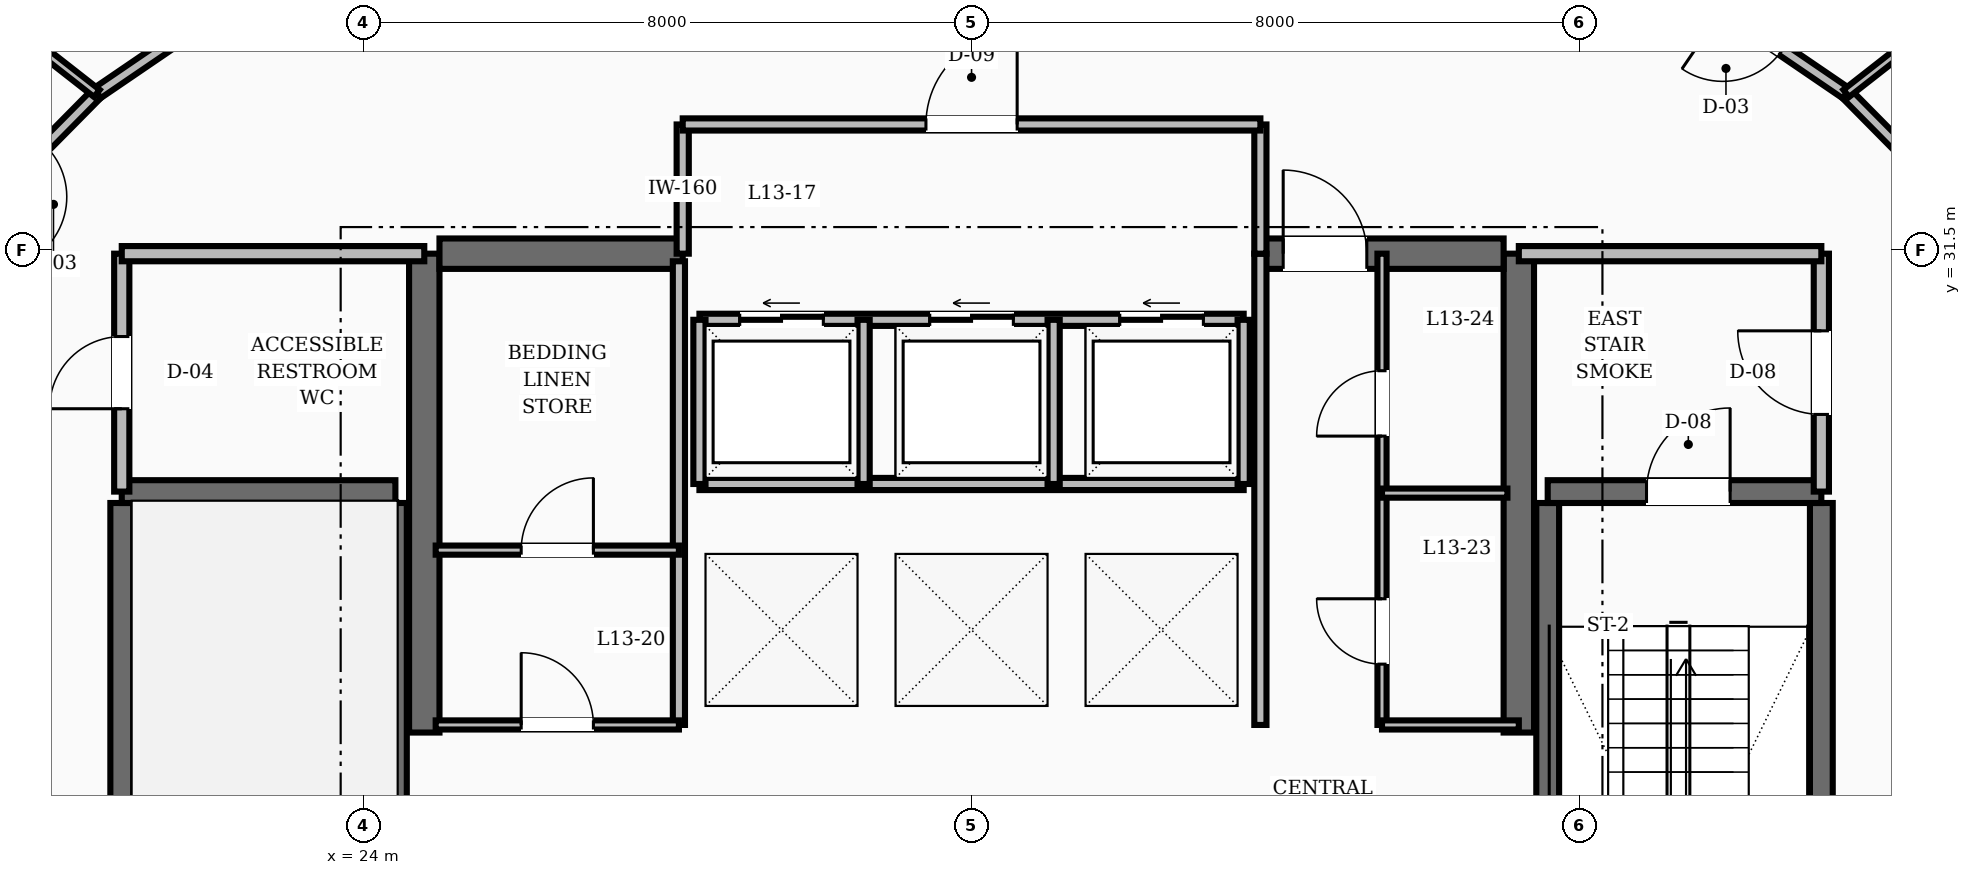
"""IFC4 building model, lengths in metres.
Left out: names, types, materials, properties, quantities, classifications, styles, units other than length and angle.
Written with IfcOpenShell. Run it as: python <this file> out.ifc"""

import sys

from ifc_helpers import new_model, si_unit, direction, frame, frame_2d, origin, place, context, subcontext, project, spatial, rectangle, extrude, element, fill, save


model = new_model("IFC4")
c1 = context("Model", 3, precision=1e-05, world=origin(), true_north=direction((0.0, 1.0)))
c2 = subcontext(c1, "Body", "Model", "MODEL_VIEW")
j1 = project(units=[si_unit("LENGTHUNIT", "METRE"), si_unit("PLANEANGLEUNIT", "RADIAN")], contexts=[c1])
p1 = place(None, origin())
s1 = spatial("IfcSite", under=j1, at=p1, CompositionType="ELEMENT")
p2 = place(p1, origin())
s2 = spatial("IfcBuilding", under=s1, at=p2, CompositionType="ELEMENT")
p3 = place(p2, frame((0.0, 0.0, 55.6)))
s3 = spatial("IfcBuildingStorey", under=s2, at=p3, CompositionType="ELEMENT", Elevation=55.6)
for number, where, z_axis, x_axis in (
    (1, (24.8, 25.15, 0.0), (0.0, 0.0, 1.0), (0.0, 1.0, 0.0)),
    (2, (39.2, 25.15, 0.0), (0.0, 0.0, 1.0), (0.0, 1.0, 0.0)),
):
    element("IfcWall", number, at=place(p3, frame(where, z_axis=z_axis, x_axis=x_axis)), inside=s3, PredefinedType="SHEAR", context=c2, shape_type="SweptSolid", body=[
        extrude(rectangle(XDim=6.3, YDim=0.4, at=frame_2d((3.15, 0.0))), origin(), (0.0, 0.0, 1.0), 3.6),
    ])
p4 = place(p3, frame((25.0, 31.45, 0.0), z_axis=(0.0, 0.0, 1.0), x_axis=(1.0, 0.0, 0.0)))
e3 = element("IfcWall", 3, at=p4, inside=s3, PredefinedType="SHEAR", context=c2, shape_type="SweptSolid", body=[
    extrude(rectangle(XDim=3.2, YDim=0.4, at=frame_2d((1.6, 0.0))), origin(), (0.0, 0.0, 1.0), 3.6),
])
p5 = place(p3, frame((35.8, 31.45, 0.0), z_axis=(0.0, 0.0, 1.0), x_axis=(1.0, 0.0, 0.0)))
e4 = element("IfcWall", 4, at=p5, inside=s3, PredefinedType="SHEAR", context=c2, shape_type="SweptSolid", body=[
    extrude(rectangle(XDim=3.2, YDim=0.4, at=frame_2d((1.6, 0.0))), origin(), (0.0, 0.0, 1.0), 3.6),
])
p6 = place(p5, frame((0.3, 0.0, 0.0)))
e5 = element("IfcOpeningElement", 5, at=p6, cuts=e4, PredefinedType="OPENING", context=c2, shape_type="SweptSolid", body=[
    extrude(rectangle(XDim=1.1, YDim=2.1, at=frame_2d((0.55, 1.05))), frame((0.0, 0.21, 0.0), z_axis=(0.0, -1.0, 0.0), x_axis=(1.0, 0.0, 0.0)), (0.0, 0.0, 1.0), 0.42),
])
for number, where, z_axis, x_axis in (
    (6, (20.82, 19.43, 0.0), (0.0, 0.0, 1.0), (0.0, 1.0, 0.0)),
    (7, (24.42, 19.43, 0.0), (0.0, 0.0, 1.0), (0.0, 1.0, 0.0)),
):
    element("IfcWall", number, at=place(p3, frame(where, z_axis=z_axis, x_axis=x_axis)), inside=s3, PredefinedType="SHEAR", context=c2, shape_type="SweptSolid", body=[
        extrude(rectangle(XDim=8.74, YDim=0.3, at=frame_2d((4.37, 0.0))), origin(), (0.0, 0.0, 1.0), 3.6),
    ])
p7 = place(p3, frame((20.82, 28.32, 0.0), z_axis=(0.0, 0.0, 1.0), x_axis=(1.0, 0.0, 0.0)))
e8 = element("IfcWall", 8, at=p7, inside=s3, PredefinedType="SHEAR", context=c2, shape_type="SweptSolid", body=[
    extrude(rectangle(XDim=3.6, YDim=0.3, at=frame_2d((1.8, 0.0))), origin(), (0.0, 0.0, 1.0), 3.6),
])
for number, where, z_axis, x_axis in (
    (9, (43.18, 19.43, 0.0), (0.0, 0.0, 1.0), (0.0, 1.0, 0.0)),
    (10, (39.58, 19.43, 0.0), (0.0, 0.0, 1.0), (0.0, 1.0, 0.0)),
):
    element("IfcWall", number, at=place(p3, frame(where, z_axis=z_axis, x_axis=x_axis)), inside=s3, PredefinedType="SHEAR", context=c2, shape_type="SweptSolid", body=[
        extrude(rectangle(XDim=8.74, YDim=0.3, at=frame_2d((4.37, 0.0))), origin(), (0.0, 0.0, 1.0), 3.6),
    ])
p8 = place(p3, frame((39.58, 28.32, 0.0), z_axis=(0.0, 0.0, 1.0), x_axis=(1.0, 0.0, 0.0)))
e11 = element("IfcWall", 11, at=p8, inside=s3, PredefinedType="SHEAR", context=c2, shape_type="SweptSolid", body=[
    extrude(rectangle(XDim=3.6, YDim=0.3, at=frame_2d((1.8, 0.0))), origin(), (0.0, 0.0, 1.0), 3.6),
])
p9 = place(p8, frame((1.3, 0.0, 0.0)))
e12 = element("IfcOpeningElement", 12, at=p9, cuts=e11, PredefinedType="OPENING", context=c2, shape_type="SweptSolid", body=[
    extrude(rectangle(XDim=1.1, YDim=2.1, at=frame_2d((0.55, 1.05))), frame((0.0, 0.16, 0.0), z_axis=(0.0, -1.0, 0.0), x_axis=(1.0, 0.0, 0.0)), (0.0, 0.0, 1.0), 0.32),
])
p10 = place(p3, frame((43.18, 28.32, 0.0), z_axis=(0.0, 0.0, 1.0), x_axis=(0.0, 1.0, 0.0)))
e13 = element("IfcWall", 13, at=p10, inside=s3, PredefinedType="SOLIDWALL", context=c2, shape_type="SweptSolid", body=[
    extrude(rectangle(XDim=3.13, YDim=0.2, at=frame_2d((1.565, 0.0))), origin(), (0.0, 0.0, 1.0), 2.61),
])
p11 = place(p10, frame((1.015, 0.0, 0.0)))
e14 = element("IfcOpeningElement", 14, at=p11, cuts=e13, PredefinedType="OPENING", context=c2, shape_type="SweptSolid", body=[
    extrude(rectangle(XDim=1.1, YDim=2.1, at=frame_2d((0.55, 1.05))), frame((0.0, 0.11, 0.0), z_axis=(0.0, -1.0, 0.0), x_axis=(1.0, 0.0, 0.0)), (0.0, 0.0, 1.0), 0.22),
])
p12 = place(p3, frame((39.2, 31.45, 0.0), z_axis=(0.0, 0.0, 1.0), x_axis=(1.0, 0.0, 0.0)))
e15 = element("IfcWall", 15, at=p12, inside=s3, PredefinedType="SOLIDWALL", context=c2, shape_type="SweptSolid", body=[
    extrude(rectangle(XDim=3.98, YDim=0.2, at=frame_2d((1.99, 0.0))), origin(), (0.0, 0.0, 1.0), 2.61),
])
p13 = place(p3, frame((20.82, 28.32, 0.0), z_axis=(0.0, 0.0, 1.0), x_axis=(0.0, 1.0, 0.0)))
e16 = element("IfcWall", 16, at=p13, inside=s3, PredefinedType="SOLIDWALL", context=c2, shape_type="SweptSolid", body=[
    extrude(rectangle(XDim=3.13, YDim=0.2, at=frame_2d((1.565, 0.0))), origin(), (0.0, 0.0, 1.0), 2.61),
])
p14 = place(p13, frame((1.09, 0.0, 0.0)))
e17 = element("IfcOpeningElement", 17, at=p14, cuts=e16, PredefinedType="OPENING", context=c2, shape_type="SweptSolid", body=[
    extrude(rectangle(XDim=0.95, YDim=2.1, at=frame_2d((0.475, 1.05))), frame((0.0, 0.11, 0.0), z_axis=(0.0, -1.0, 0.0), x_axis=(1.0, 0.0, 0.0)), (0.0, 0.0, 1.0), 0.22),
])
p15 = place(p3, frame((20.82, 31.45, 0.0), z_axis=(0.0, 0.0, 1.0), x_axis=(1.0, 0.0, 0.0)))
e18 = element("IfcWall", 18, at=p15, inside=s3, PredefinedType="SOLIDWALL", context=c2, shape_type="SweptSolid", body=[
    extrude(rectangle(XDim=3.98, YDim=0.2, at=frame_2d((1.99, 0.0))), origin(), (0.0, 0.0, 1.0), 2.61),
])
p16 = place(p3, frame((35.8, 25.25, 0.0), z_axis=(0.0, 0.0, 1.0), x_axis=(0.0, 1.0, 0.0)))
e19 = element("IfcWall", 19, at=p16, inside=s3, PredefinedType="SOLIDWALL", context=c2, shape_type="SweptSolid", body=[
    extrude(rectangle(XDim=6.2, YDim=0.16, at=frame_2d((3.1, 0.0))), origin(), (0.0, 0.0, 1.0), 2.61),
])
p17 = place(p3, frame((28.42, 30.58, 0.0), z_axis=(0.0, 0.0, 1.0), x_axis=(1.0, 0.0, 0.0)))
e20 = element("IfcWall", 20, at=p17, inside=s3, PredefinedType="SOLIDWALL", context=c2, shape_type="SweptSolid", body=[
    extrude(rectangle(XDim=7.16, YDim=0.16, at=frame_2d((3.58, 0.0))), origin(), (0.0, 0.0, 1.0), 2.61),
])
p18 = place(p17, frame((0.53, 0.0, 0.0)))
e21 = element("IfcOpeningElement", 21, at=p18, cuts=e20, PredefinedType="OPENING", context=c2, shape_type="SweptSolid", body=[
    extrude(rectangle(XDim=1.1, YDim=2.15, at=frame_2d((0.55, 1.075))), frame((0.0, 0.09, 0.0), z_axis=(0.0, -1.0, 0.0), x_axis=(1.0, 0.0, 0.0)), (0.0, 0.0, 1.0), 0.18),
])
p19 = place(p17, frame((3.03, 0.0, 0.0)))
e22 = element("IfcOpeningElement", 22, at=p19, cuts=e20, PredefinedType="OPENING", context=c2, shape_type="SweptSolid", body=[
    extrude(rectangle(XDim=1.1, YDim=2.15, at=frame_2d((0.55, 1.075))), frame((0.0, 0.09, 0.0), z_axis=(0.0, -1.0, 0.0), x_axis=(1.0, 0.0, 0.0)), (0.0, 0.0, 1.0), 0.18),
])
p20 = place(p17, frame((5.53, 0.0, 0.0)))
e23 = element("IfcOpeningElement", 23, at=p20, cuts=e20, PredefinedType="OPENING", context=c2, shape_type="SweptSolid", body=[
    extrude(rectangle(XDim=1.1, YDim=2.15, at=frame_2d((0.55, 1.075))), frame((0.0, 0.09, 0.0), z_axis=(0.0, -1.0, 0.0), x_axis=(1.0, 0.0, 0.0)), (0.0, 0.0, 1.0), 0.18),
])
p21 = place(p3, frame((28.42, 28.42, 0.0), z_axis=(0.0, 0.0, 1.0), x_axis=(1.0, 0.0, 0.0)))
e24 = element("IfcWall", 24, at=p21, inside=s3, PredefinedType="SOLIDWALL", context=c2, shape_type="SweptSolid", body=[
    extrude(rectangle(XDim=7.16, YDim=0.16, at=frame_2d((3.58, 0.0))), origin(), (0.0, 0.0, 1.0), 2.61),
])
for number, where, z_axis, x_axis in (
    (25, (28.42, 28.42, 0.0), (0.0, 0.0, 1.0), (0.0, 1.0, 0.0)),
    (26, (30.58, 28.42, 0.0), (0.0, 0.0, 1.0), (0.0, 1.0, 0.0)),
    (27, (33.08, 28.42, 0.0), (0.0, 0.0, 1.0), (0.0, 1.0, 0.0)),
    (28, (35.58, 28.42, 0.0), (0.0, 0.0, 1.0), (0.0, 1.0, 0.0)),
):
    element("IfcWall", number, at=place(p3, frame(where, z_axis=z_axis, x_axis=x_axis)), inside=s3, PredefinedType="SOLIDWALL", context=c2, shape_type="SweptSolid", body=[
        extrude(rectangle(XDim=2.16, YDim=0.16, at=frame_2d((1.08, 0.0))), origin(), (0.0, 0.0, 1.0), 2.61),
    ])
for number, where, z_axis, x_axis in (
    (29, (28.2, 31.45, 0.0), (0.0, 0.0, 1.0), (0.0, 1.0, 0.0)),
    (30, (35.8, 31.45, 0.0), (0.0, 0.0, 1.0), (0.0, 1.0, 0.0)),
):
    element("IfcWall", number, at=place(p3, frame(where, z_axis=z_axis, x_axis=x_axis)), inside=s3, PredefinedType="SOLIDWALL", context=c2, shape_type="SweptSolid", body=[
        extrude(rectangle(XDim=1.7, YDim=0.16, at=frame_2d((0.85, 0.0))), origin(), (0.0, 0.0, 1.0), 2.61),
    ])
p22 = place(p3, frame((28.2, 33.15, 0.0), z_axis=(0.0, 0.0, 1.0), x_axis=(1.0, 0.0, 0.0)))
e31 = element("IfcWall", 31, at=p22, inside=s3, PredefinedType="SOLIDWALL", context=c2, shape_type="SweptSolid", body=[
    extrude(rectangle(XDim=7.6, YDim=0.16, at=frame_2d((3.8, 0.0))), origin(), (0.0, 0.0, 1.0), 2.61),
])
p23 = place(p22, frame((3.2, 0.0, 0.0)))
e32 = element("IfcOpeningElement", 32, at=p23, cuts=e31, PredefinedType="OPENING", context=c2, shape_type="SweptSolid", body=[
    extrude(rectangle(XDim=1.2, YDim=2.1, at=frame_2d((0.6, 1.05))), frame((0.0, 0.09, 0.0), z_axis=(0.0, -1.0, 0.0), x_axis=(1.0, 0.0, 0.0)), (0.0, 0.0, 1.0), 0.18),
])
p24 = place(p3, frame((28.15, 25.25, 0.0), z_axis=(0.0, 0.0, 1.0), x_axis=(0.0, 1.0, 0.0)))
e33 = element("IfcWall", 33, at=p24, inside=s3, PredefinedType="SOLIDWALL", context=c2, shape_type="SweptSolid", body=[
    extrude(rectangle(XDim=6.1, YDim=0.16, at=frame_2d((3.05, 0.0))), origin(), (0.0, 0.0, 1.0), 2.61),
])
p25 = place(p3, frame((24.95, 25.25, 0.0), z_axis=(0.0, 0.0, 1.0), x_axis=(1.0, 0.0, 0.0)))
e34 = element("IfcWall", 34, at=p25, inside=s3, PredefinedType="PARTITIONING", context=c2, shape_type="SweptSolid", body=[
    extrude(rectangle(XDim=3.2, YDim=0.12, at=frame_2d((1.6, 0.0))), origin(), (0.0, 0.0, 1.0), 2.61),
])
p26 = place(p25, frame((1.125, 0.0, 0.0)))
e35 = element("IfcOpeningElement", 35, at=p26, cuts=e34, PredefinedType="OPENING", context=c2, shape_type="SweptSolid", body=[
    extrude(rectangle(XDim=0.95, YDim=2.1, at=frame_2d((0.475, 1.05))), frame((0.0, 0.07, 0.0), z_axis=(0.0, -1.0, 0.0), x_axis=(1.0, 0.0, 0.0)), (0.0, 0.0, 1.0), 0.14),
])
p27 = place(p3, frame((37.4, 25.25, 0.0), z_axis=(0.0, 0.0, 1.0), x_axis=(0.0, 1.0, 0.0)))
e36 = element("IfcWall", 36, at=p27, inside=s3, PredefinedType="PARTITIONING", context=c2, shape_type="SweptSolid", body=[
    extrude(rectangle(XDim=6.2, YDim=0.12, at=frame_2d((3.1, 0.0))), origin(), (0.0, 0.0, 1.0), 2.61),
])
p28 = place(p27, frame((0.8, 0.0, 0.0)))
e37 = element("IfcOpeningElement", 37, at=p28, cuts=e36, PredefinedType="OPENING", context=c2, shape_type="SweptSolid", body=[
    extrude(rectangle(XDim=0.86, YDim=2.1, at=frame_2d((0.43, 1.05))), frame((0.0, 0.07, 0.0), z_axis=(0.0, -1.0, 0.0), x_axis=(1.0, 0.0, 0.0)), (0.0, 0.0, 1.0), 0.14),
])
p29 = place(p27, frame((3.8, 0.0, 0.0)))
e38 = element("IfcOpeningElement", 38, at=p29, cuts=e36, PredefinedType="OPENING", context=c2, shape_type="SweptSolid", body=[
    extrude(rectangle(XDim=0.86, YDim=2.1, at=frame_2d((0.43, 1.05))), frame((0.0, 0.07, 0.0), z_axis=(0.0, -1.0, 0.0), x_axis=(1.0, 0.0, 0.0)), (0.0, 0.0, 1.0), 0.14),
])
p30 = place(p3, frame((37.4, 25.25, 0.0), z_axis=(0.0, 0.0, 1.0), x_axis=(1.0, 0.0, 0.0)))
e39 = element("IfcWall", 39, at=p30, inside=s3, PredefinedType="PARTITIONING", context=c2, shape_type="SweptSolid", body=[
    extrude(rectangle(XDim=1.8, YDim=0.12, at=frame_2d((0.9, 0.0))), origin(), (0.0, 0.0, 1.0), 2.61),
])
p31 = place(p3, frame((24.95, 27.55, 0.0), z_axis=(0.0, 0.0, 1.0), x_axis=(1.0, 0.0, 0.0)))
e40 = element("IfcWall", 40, at=p31, inside=s3, PredefinedType="PARTITIONING", context=c2, shape_type="SweptSolid", body=[
    extrude(rectangle(XDim=3.2, YDim=0.12, at=frame_2d((1.6, 0.0))), origin(), (0.0, 0.0, 1.0), 2.61),
])
p32 = place(p31, frame((1.125, 0.0, 0.0)))
e41 = element("IfcOpeningElement", 41, at=p32, cuts=e40, PredefinedType="OPENING", context=c2, shape_type="SweptSolid", body=[
    extrude(rectangle(XDim=0.95, YDim=2.1, at=frame_2d((0.475, 1.05))), frame((0.0, 0.07, 0.0), z_axis=(0.0, -1.0, 0.0), x_axis=(1.0, 0.0, 0.0)), (0.0, 0.0, 1.0), 0.14),
])
p33 = place(p3, frame((37.4, 28.3, 0.0), z_axis=(0.0, 0.0, 1.0), x_axis=(1.0, 0.0, 0.0)))
e42 = element("IfcWall", 42, at=p33, inside=s3, PredefinedType="PARTITIONING", context=c2, shape_type="SweptSolid", body=[
    extrude(rectangle(XDim=1.65, YDim=0.12, at=frame_2d((0.825, 0.0))), origin(), (0.0, 0.0, 1.0), 2.61),
])
p34 = place(p3, frame((45.531, 31.51, 0.0), z_axis=(0.0, 0.0, 1.0), x_axis=(-0.702811997, 0.711375636969, 0.0)))
e43 = element("IfcWall", 43, at=p34, inside=s3, PredefinedType="SOLIDWALL", context=c2, shape_type="SweptSolid", body=[
    extrude(rectangle(XDim=2.879, YDim=0.16, at=frame_2d((1.44, 0.0))), origin(), (0.0, 0.0, 1.0), 2.61),
])
p35 = place(p3, frame((43.508, 33.559, 0.0), z_axis=(0.0, 0.0, 1.0), x_axis=(-0.826293096206, 0.56324037423, 0.0)))
e44 = element("IfcWall", 44, at=p35, inside=s3, PredefinedType="SOLIDWALL", context=c2, shape_type="SweptSolid", body=[
    extrude(rectangle(XDim=2.985, YDim=0.16, at=frame_2d((1.492, 0.0))), origin(), (0.0, 0.0, 1.0), 2.61),
])
p36 = place(p35, frame((1.017, 0.0, 0.0)))
e45 = element("IfcOpeningElement", 45, at=p36, cuts=e44, PredefinedType="OPENING", context=c2, shape_type="SweptSolid", body=[
    extrude(rectangle(XDim=0.95, YDim=2.1, at=frame_2d((0.475, 1.05))), frame((0.0, 0.09, 0.0), z_axis=(0.0, -1.0, 0.0), x_axis=(1.0, 0.0, 0.0)), (0.0, 0.0, 1.0), 0.18),
])
p37 = place(p3, frame((22.959, 35.24, 0.0), z_axis=(0.0, 0.0, 1.0), x_axis=(-0.826293096206, -0.56324037423, 0.0)))
e46 = element("IfcWall", 46, at=p37, inside=s3, PredefinedType="SOLIDWALL", context=c2, shape_type="SweptSolid", body=[
    extrude(rectangle(XDim=2.985, YDim=0.16, at=frame_2d((1.492, 0.0))), origin(), (0.0, 0.0, 1.0), 2.61),
])
p38 = place(p3, frame((20.492, 33.559, 0.0), z_axis=(0.0, 0.0, 1.0), x_axis=(-0.702811997, -0.711375636969, 0.0)))
e47 = element("IfcWall", 47, at=p38, inside=s3, PredefinedType="SOLIDWALL", context=c2, shape_type="SweptSolid", body=[
    extrude(rectangle(XDim=2.879, YDim=0.16, at=frame_2d((1.44, 0.0))), origin(), (0.0, 0.0, 1.0), 2.61),
])
p39 = place(p38, frame((0.965, 0.0, 0.0)))
e48 = element("IfcOpeningElement", 48, at=p39, cuts=e47, PredefinedType="OPENING", context=c2, shape_type="SweptSolid", body=[
    extrude(rectangle(XDim=0.95, YDim=2.1, at=frame_2d((0.475, 1.05))), frame((0.0, 0.09, 0.0), z_axis=(0.0, -1.0, 0.0), x_axis=(1.0, 0.0, 0.0)), (0.0, 0.0, 1.0), 0.18),
])
for number, where, z_axis, x_axis in (
    (49, (43.508, 33.559, 0.0), (0.0, 0.0, 1.0), (0.787, 0.616, 0.0)),
    (50, (20.492, 33.559, 0.0), (0.0, 0.0, 1.0), (-0.787, 0.616, 0.0)),
):
    element("IfcWall", number, at=place(p3, frame(where, z_axis=z_axis, x_axis=x_axis)), inside=s3, PredefinedType="PARTITIONING", context=c2, shape_type="SweptSolid", body=[
        extrude(rectangle(XDim=3.524, YDim=0.12, at=frame_2d((1.762, 0.0))), origin(), (0.0, 0.0, 1.0), 2.61),
    ])
p40 = place(p9, origin())
e51 = element("IfcDoor", 51, at=p40, inside=s3, OperationType="SINGLE_SWING_RIGHT", PredefinedType="DOOR", context=c2, shape_type="SweptSolid", body=[
    extrude(rectangle(XDim=1.1, YDim=2.1, at=frame_2d((0.55, 1.05))), frame((0.0, 0.025, 0.0), z_axis=(0.0, -1.0, 0.0), x_axis=(1.0, 0.0, 0.0)), (0.0, 0.0, 1.0), 0.05),
])
fill(e12, e51)
p41 = place(p11, origin())
e52 = element("IfcDoor", 52, at=p41, inside=s3, OperationType="SINGLE_SWING_RIGHT", PredefinedType="DOOR", context=c2, shape_type="SweptSolid", body=[
    extrude(rectangle(XDim=1.1, YDim=2.1, at=frame_2d((0.55, 1.05))), frame((0.0, 0.025, 0.0), z_axis=(0.0, -1.0, 0.0), x_axis=(1.0, 0.0, 0.0)), (0.0, 0.0, 1.0), 0.05),
])
fill(e14, e52)
p42 = place(p14, origin())
e53 = element("IfcDoor", 53, at=p42, inside=s3, OperationType="SINGLE_SWING_LEFT", PredefinedType="DOOR", context=c2, shape_type="SweptSolid", body=[
    extrude(rectangle(XDim=0.95, YDim=2.1, at=frame_2d((0.475, 1.05))), frame((0.0, 0.025, 0.0), z_axis=(0.0, -1.0, 0.0), x_axis=(1.0, 0.0, 0.0)), (0.0, 0.0, 1.0), 0.05),
])
fill(e17, e53)
p43 = place(p6, origin())
e54 = element("IfcDoor", 54, at=p43, inside=s3, OperationType="SINGLE_SWING_LEFT", PredefinedType="DOOR", context=c2, shape_type="SweptSolid", body=[
    extrude(rectangle(XDim=1.1, YDim=2.1, at=frame_2d((0.55, 1.05))), frame((0.0, 0.025, 0.0), z_axis=(0.0, -1.0, 0.0), x_axis=(1.0, 0.0, 0.0)), (0.0, 0.0, 1.0), 0.05),
])
fill(e5, e54)
p44 = place(p18, origin())
e55 = element("IfcDoor", 55, at=p44, inside=s3, OperationType="SLIDING_TO_LEFT", PredefinedType="DOOR", context=c2, shape_type="SweptSolid", body=[
    extrude(rectangle(XDim=1.1, YDim=2.15, at=frame_2d((0.55, 1.075))), frame((0.0, 0.025, 0.0), z_axis=(0.0, -1.0, 0.0), x_axis=(1.0, 0.0, 0.0)), (0.0, 0.0, 1.0), 0.05),
])
fill(e21, e55)
p45 = place(p19, origin())
e56 = element("IfcDoor", 56, at=p45, inside=s3, OperationType="SLIDING_TO_LEFT", PredefinedType="DOOR", context=c2, shape_type="SweptSolid", body=[
    extrude(rectangle(XDim=1.1, YDim=2.15, at=frame_2d((0.55, 1.075))), frame((0.0, 0.025, 0.0), z_axis=(0.0, -1.0, 0.0), x_axis=(1.0, 0.0, 0.0)), (0.0, 0.0, 1.0), 0.05),
])
fill(e22, e56)
p46 = place(p20, origin())
e57 = element("IfcDoor", 57, at=p46, inside=s3, OperationType="SLIDING_TO_LEFT", PredefinedType="DOOR", context=c2, shape_type="SweptSolid", body=[
    extrude(rectangle(XDim=1.1, YDim=2.15, at=frame_2d((0.55, 1.075))), frame((0.0, 0.025, 0.0), z_axis=(0.0, -1.0, 0.0), x_axis=(1.0, 0.0, 0.0)), (0.0, 0.0, 1.0), 0.05),
])
fill(e23, e57)
p47 = place(p23, origin())
e58 = element("IfcDoor", 58, at=p47, inside=s3, OperationType="SINGLE_SWING_RIGHT", PredefinedType="DOOR", context=c2, shape_type="SweptSolid", body=[
    extrude(rectangle(XDim=1.2, YDim=2.1, at=frame_2d((0.6, 1.05))), frame((0.0, 0.025, 0.0), z_axis=(0.0, -1.0, 0.0), x_axis=(1.0, 0.0, 0.0)), (0.0, 0.0, 1.0), 0.05),
])
fill(e32, e58)
p48 = place(p26, origin())
e59 = element("IfcDoor", 59, at=p48, inside=s3, OperationType="SINGLE_SWING_LEFT", PredefinedType="DOOR", context=c2, shape_type="SweptSolid", body=[
    extrude(rectangle(XDim=0.95, YDim=2.1, at=frame_2d((0.475, 1.05))), frame((0.0, 0.025, 0.0), z_axis=(0.0, -1.0, 0.0), x_axis=(1.0, 0.0, 0.0)), (0.0, 0.0, 1.0), 0.05),
])
fill(e35, e59)
p49 = place(p32, origin())
e60 = element("IfcDoor", 60, at=p49, inside=s3, OperationType="SINGLE_SWING_RIGHT", PredefinedType="DOOR", context=c2, shape_type="SweptSolid", body=[
    extrude(rectangle(XDim=0.95, YDim=2.1, at=frame_2d((0.475, 1.05))), frame((0.0, 0.025, 0.0), z_axis=(0.0, -1.0, 0.0), x_axis=(1.0, 0.0, 0.0)), (0.0, 0.0, 1.0), 0.05),
])
fill(e41, e60)
p50 = place(p28, origin())
e61 = element("IfcDoor", 61, at=p50, inside=s3, OperationType="SINGLE_SWING_RIGHT", PredefinedType="DOOR", context=c2, shape_type="SweptSolid", body=[
    extrude(rectangle(XDim=0.86, YDim=2.1, at=frame_2d((0.43, 1.05))), frame((0.0, 0.025, 0.0), z_axis=(0.0, -1.0, 0.0), x_axis=(1.0, 0.0, 0.0)), (0.0, 0.0, 1.0), 0.05),
])
fill(e37, e61)
p51 = place(p29, origin())
e62 = element("IfcDoor", 62, at=p51, inside=s3, OperationType="SINGLE_SWING_LEFT", PredefinedType="DOOR", context=c2, shape_type="SweptSolid", body=[
    extrude(rectangle(XDim=0.86, YDim=2.1, at=frame_2d((0.43, 1.05))), frame((0.0, 0.025, 0.0), z_axis=(0.0, -1.0, 0.0), x_axis=(1.0, 0.0, 0.0)), (0.0, 0.0, 1.0), 0.05),
])
fill(e38, e62)
save(model, sys.argv[1])
